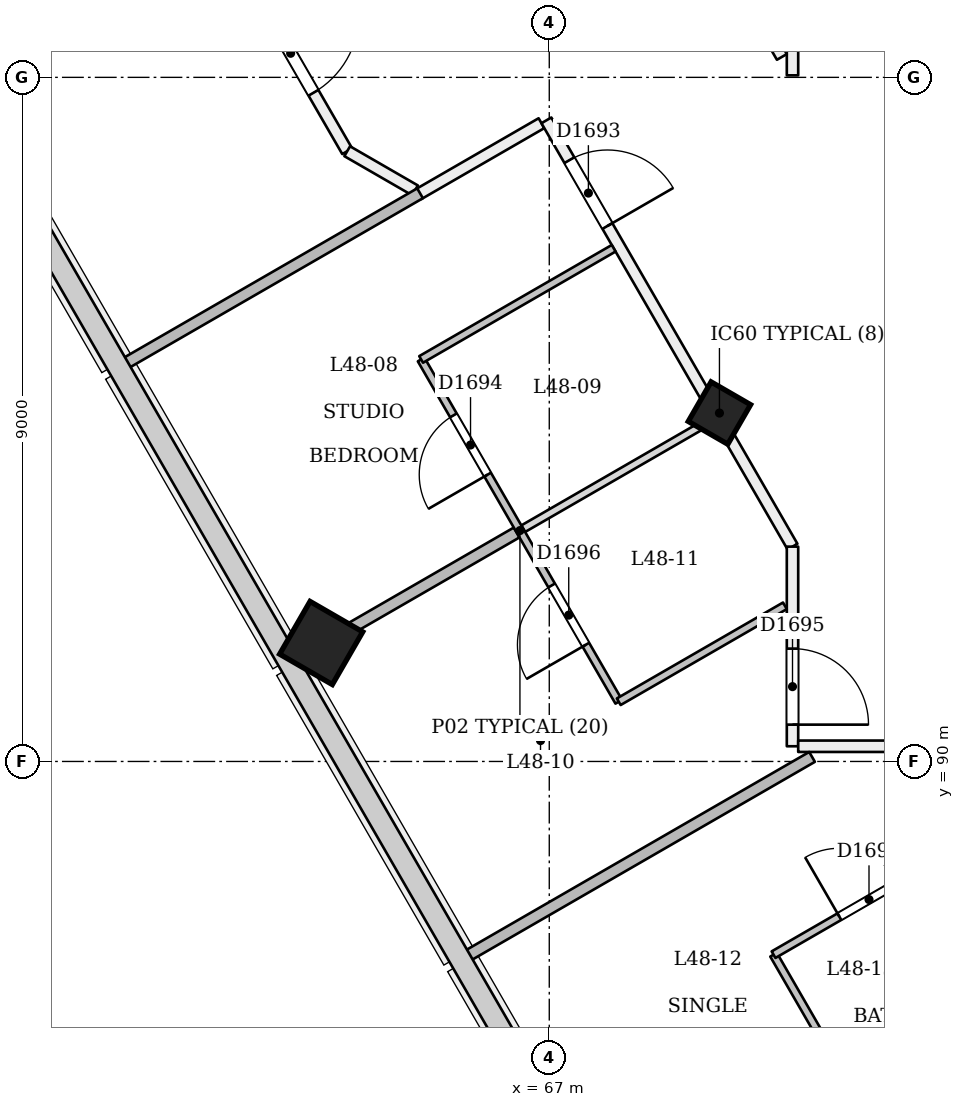
"""IFC4 building model, lengths in metres.
Left out: names, types, materials, properties, quantities, classifications, styles, units other than length and angle.
Written with IfcOpenShell. Run it as: python <this file> out.ifc"""

import sys

from ifc_helpers import new_model, si_unit, direction, frame, frame_2d, origin, origin_2d, place, context, subcontext, project, spatial, rectangle, extrude, element, fill, save


model = new_model("IFC4")
c1 = context("Model", 3, precision=1e-05, world=origin(), true_north=direction((0.0, 1.0)))
c2 = subcontext(c1, "Body", "Model", "MODEL_VIEW")
j1 = project(units=[si_unit("LENGTHUNIT", "METRE"), si_unit("PLANEANGLEUNIT", "RADIAN")], contexts=[c1])
p1 = place(None, origin())
s1 = spatial("IfcSite", under=j1, at=p1, CompositionType="ELEMENT")
p2 = place(p1, origin())
s2 = spatial("IfcBuilding", under=s1, at=p2, CompositionType="ELEMENT")
p3 = place(p2, frame((0.0, 0.0, 185.4)))
s3 = spatial("IfcBuildingStorey", under=s2, at=p3, CompositionType="ELEMENT", Elevation=185.4)
p4 = place(p3, frame((69.212, 94.537, -0.018), z_axis=(0.022222852987, 0.038483477124, 0.999012095419), x_axis=(-0.86564203211, -0.499182083575, 0.038485317735)))
e1 = element("IfcColumn", 1, at=p4, inside=s3, PredefinedType="COLUMN", context=c2, shape_type="SweptSolid", body=[
    extrude(rectangle(XDim=0.6, YDim=0.6, at=origin_2d()), origin(), (0.0, 0.0, 1.0), 3.604),
])
p5 = place(p3, frame((63.972, 91.511, -0.024), z_axis=(0.02220780257, 0.038426228083, 0.999014633777), x_axis=(-0.865818494865, -0.498879763134, 0.038435867164)))
e2 = element("IfcColumn", 2, at=p5, inside=s3, PredefinedType="COLUMN", context=c2, shape_type="SweptSolid", body=[
    extrude(rectangle(XDim=0.8, YDim=0.8, at=origin_2d()), origin(), (0.0, 0.0, 1.0), 3.628),
])
p6 = place(p3, frame((65.28, 97.463, 0.0), z_axis=(0.0, 0.0, 1.0), x_axis=(0.866046247233, 0.49996389635, 0.0)))
e3 = element("IfcWall", 3, at=p6, inside=s3, PredefinedType="PARTITIONING", context=c2, shape_type="SweptSolid", body=[
    extrude(rectangle(XDim=1.867, YDim=0.15, at=frame_2d((0.934, 0.0))), origin(), (0.0, 0.0, 1.0), 3.3),
])
p7 = place(p3, frame((66.962, 98.435, 0.0), z_axis=(0.0, 0.0, 1.0), x_axis=(0.499991148707, -0.866030514021, 0.0)))
e4 = element("IfcWall", 4, at=p7, inside=s3, PredefinedType="PARTITIONING", context=c2, shape_type="SweptSolid", body=[
    extrude(rectangle(XDim=6.476, YDim=0.15, at=frame_2d((3.238, 0.0))), origin(), (0.0, 0.0, 1.0), 2.9),
])
p8 = place(p7, frame((0.605, 0.0, 0.0)))
e5 = element("IfcOpeningElement", 5, at=p8, cuts=e4, PredefinedType="OPENING", context=c2, shape_type="SweptSolid", body=[
    extrude(rectangle(XDim=1.0, YDim=2.1, at=frame_2d((0.5, 1.05))), frame((0.0, 0.085, 0.0), z_axis=(0.0, -1.0, 0.0), x_axis=(1.0, 0.0, 0.0)), (0.0, 0.0, 1.0), 0.171),
])
p9 = place(p3, frame((70.2, 92.826, 0.0), z_axis=(0.0, 0.0, 1.0), x_axis=(0.0, -1.0, 0.0)))
e6 = element("IfcWall", 6, at=p9, inside=s3, PredefinedType="PARTITIONING", context=c2, shape_type="SweptSolid", body=[
    extrude(rectangle(XDim=2.626, YDim=0.15, at=frame_2d((1.313, 0.0))), origin(), (0.0, 0.0, 1.0), 3.3),
])
p10 = place(p9, frame((1.342, 0.0, 0.0)))
e7 = element("IfcOpeningElement", 7, at=p10, cuts=e6, PredefinedType="OPENING", context=c2, shape_type="SweptSolid", body=[
    extrude(rectangle(XDim=1.0, YDim=2.1, at=frame_2d((0.5, 1.05))), frame((0.0, 0.085, 0.0), z_axis=(0.0, -1.0, 0.0), x_axis=(1.0, 0.0, 0.0)), (0.0, 0.0, 1.0), 0.171),
])
p11 = place(p3, frame((70.275, 90.2, 0.0), z_axis=(0.0, 0.0, 1.0), x_axis=(1.0, 0.0, 0.0)))
e8 = element("IfcWall", 8, at=p11, inside=s3, PredefinedType="PARTITIONING", context=c2, shape_type="SweptSolid", body=[
    extrude(rectangle(XDim=1.441, YDim=0.15, at=frame_2d((0.721, 0.0))), origin(), (0.0, 0.0, 1.0), 3.3),
])
p12 = place(p3, frame((70.2, 101.4, 0.0), z_axis=(0.0, 0.0, 1.0), x_axis=(0.0, -1.0, 0.0)))
e9 = element("IfcWall", 9, at=p12, inside=s3, PredefinedType="PARTITIONING", context=c2, shape_type="SweptSolid", body=[
    extrude(rectangle(XDim=2.374, YDim=0.15, at=frame_2d((1.187, 0.0))), origin(), (0.0, 0.0, 1.0), 3.3),
])
p13 = place(p3, frame((70.06, 99.269, 0.0), z_axis=(0.0, 0.0, 1.0), x_axis=(-0.500063959222, 0.865988473761, 0.0)))
e10 = element("IfcWall", 10, at=p13, inside=s3, PredefinedType="PARTITIONING", context=c2, shape_type="SweptSolid", body=[
    extrude(rectangle(XDim=1.733, YDim=0.15, at=frame_2d((0.866, 0.0))), origin(), (0.0, 0.0, 1.0), 3.3),
])
p14 = place(p3, frame((63.133, 100.122, 0.0), z_axis=(0.0, 0.0, 1.0), x_axis=(0.500005054149, -0.86602248575, 0.0)))
e11 = element("IfcWall", 11, at=p14, inside=s3, PredefinedType="PARTITIONING", context=c2, shape_type="SweptSolid", body=[
    extrude(rectangle(XDim=2.418, YDim=0.15, at=frame_2d((1.209, 0.0))), origin(), (0.0, 0.0, 1.0), 3.3),
])
p15 = place(p14, frame((0.33, 0.0, 0.0)))
e12 = element("IfcOpeningElement", 12, at=p15, cuts=e11, PredefinedType="OPENING", context=c2, shape_type="SweptSolid", body=[
    extrude(rectangle(XDim=1.2, YDim=2.1, at=frame_2d((0.6, 1.05))), frame((0.0, 0.085, 0.0), z_axis=(0.0, -1.0, 0.0), x_axis=(1.0, 0.0, 0.0)), (0.0, 0.0, 1.0), 0.171),
])
p16 = place(p3, frame((64.342, 98.028, 0.0), z_axis=(0.0, 0.0, 1.0), x_axis=(0.865988239976, -0.50006436408, 0.0)))
e13 = element("IfcWall", 13, at=p16, inside=s3, PredefinedType="PARTITIONING", context=c2, shape_type="SweptSolid", body=[
    extrude(rectangle(XDim=1.03, YDim=0.15, at=frame_2d((0.515, 0.0))), origin(), (0.0, 0.0, 1.0), 3.3),
])
p17 = place(p3, frame((67.914, 90.786, 0.0), z_axis=(0.0, 0.0, 1.0), x_axis=(-0.499971721724, 0.866041729639, 0.0)))
e14 = element("IfcWall", 14, at=p17, inside=s3, PredefinedType="PARTITIONING", context=c2, shape_type="SweptSolid", body=[
    extrude(rectangle(XDim=5.2, YDim=0.1, at=frame_2d((2.6, 0.0))), origin(), (0.0, 0.0, 1.0), 2.9),
])
p18 = place(p17, frame((3.45, 0.0, 0.0)))
e15 = element("IfcOpeningElement", 15, at=p18, cuts=e14, PredefinedType="OPENING", context=c2, shape_type="SweptSolid", body=[
    extrude(rectangle(XDim=0.9, YDim=2.1, at=frame_2d((0.45, 1.05))), frame((0.0, 0.061, 0.0), z_axis=(0.0, -1.0, 0.0), x_axis=(1.0, 0.0, 0.0)), (0.0, 0.0, 1.0), 0.121),
])
p19 = place(p17, frame((0.866, 0.0, 0.0)))
e16 = element("IfcOpeningElement", 16, at=p19, cuts=e14, PredefinedType="OPENING", context=c2, shape_type="SweptSolid", body=[
    extrude(rectangle(XDim=0.9, YDim=2.1, at=frame_2d((0.45, 1.05))), frame((0.0, 0.061, 0.0), z_axis=(0.0, -1.0, 0.0), x_axis=(1.0, 0.0, 0.0)), (0.0, 0.0, 1.0), 0.121),
])
p20 = place(p3, frame((65.314, 95.289, 0.0), z_axis=(0.0, 0.0, 1.0), x_axis=(0.866025730634, 0.499999433879, 0.0)))
e17 = element("IfcWall", 17, at=p20, inside=s3, PredefinedType="PARTITIONING", context=c2, shape_type="SweptSolid", body=[
    extrude(rectangle(XDim=2.925, YDim=0.1, at=frame_2d((1.462, 0.0))), origin(), (0.0, 0.0, 1.0), 3.3),
])
p21 = place(p3, frame((63.67, 91.337, 0.0), z_axis=(0.0, 0.0, 1.0), x_axis=(0.866014461049, 0.500018952895, 0.0)))
e18 = element("IfcWall", 18, at=p21, inside=s3, PredefinedType="PARTITIONING", context=c2, shape_type="SweptSolid", body=[
    extrude(rectangle(XDim=3.35, YDim=0.15, at=frame_2d((1.675, 0.0))), origin(), (0.0, 0.0, 1.0), 2.9),
])
p22 = place(p3, frame((65.3, 97.475, 0.0), z_axis=(0.0, 0.0, 1.0), x_axis=(-0.866024802457, -0.500001041529, 0.0)))
e19 = element("IfcWall", 19, at=p22, inside=s3, PredefinedType="PARTITIONING", context=c2, shape_type="SweptSolid", body=[
    extrude(rectangle(XDim=4.501, YDim=0.15, at=frame_2d((2.25, 0.0))), origin(), (0.0, 0.0, 1.0), 3.3),
])
p23 = place(p3, frame((66.657, 93.062, 0.0), z_axis=(0.0, 0.0, 1.0), x_axis=(0.866018712932, 0.500011588718, 0.0)))
e20 = element("IfcWall", 20, at=p23, inside=s3, PredefinedType="PARTITIONING", context=c2, shape_type="SweptSolid", body=[
    extrude(rectangle(XDim=2.875, YDim=0.1, at=frame_2d((1.438, 0.0))), origin(), (0.0, 0.0, 1.0), 2.9),
])
p24 = place(p3, frame((70.1, 92.048, 0.0), z_axis=(0.0, 0.0, 1.0), x_axis=(-0.866008413041, -0.500029427677, 0.0)))
e21 = element("IfcWall", 21, at=p24, inside=s3, PredefinedType="PARTITIONING", context=c2, shape_type="SweptSolid", body=[
    extrude(rectangle(XDim=2.524, YDim=0.1, at=frame_2d((1.262, 0.0))), origin(), (0.0, 0.0, 1.0), 3.3),
])
p25 = place(p3, frame((65.902, 87.43, 0.0), z_axis=(0.0, 0.0, 1.0), x_axis=(0.86602945008, 0.499992991546, 0.0)))
e22 = element("IfcWall", 22, at=p25, inside=s3, PredefinedType="PARTITIONING", context=c2, shape_type="SweptSolid", body=[
    extrude(rectangle(XDim=5.26, YDim=0.15, at=frame_2d((2.63, 0.0))), origin(), (0.0, 0.0, 1.0), 3.3),
])
p26 = place(p3, frame((71.051, 85.553, 0.0), z_axis=(0.0, 0.0, 1.0), x_axis=(-0.50002983664, 0.866008176907, 0.0)))
e23 = element("IfcWall", 23, at=p26, inside=s3, PredefinedType="PARTITIONING", context=c2, shape_type="SweptSolid", body=[
    extrude(rectangle(XDim=2.2, YDim=0.1, at=frame_2d((1.1, 0.0))), origin(), (0.0, 0.0, 1.0), 3.3),
])
p27 = place(p3, frame((69.951, 87.458, 0.0), z_axis=(0.0, 0.0, 1.0), x_axis=(0.866048868473, 0.499959355765, 0.0)))
e24 = element("IfcWall", 24, at=p27, inside=s3, PredefinedType="PARTITIONING", context=c2, shape_type="SweptSolid", body=[
    extrude(rectangle(XDim=2.825, YDim=0.1, at=frame_2d((1.413, 0.0))), origin(), (0.0, 0.0, 1.0), 3.3),
])
p28 = place(p27, frame((1.0, 0.0, 0.0)))
e25 = element("IfcOpeningElement", 25, at=p28, cuts=e24, PredefinedType="OPENING", context=c2, shape_type="SweptSolid", body=[
    extrude(rectangle(XDim=0.9, YDim=2.1, at=frame_2d((0.45, 1.05))), frame((0.0, 0.061, 0.0), z_axis=(0.0, -1.0, 0.0), x_axis=(1.0, 0.0, 0.0)), (0.0, 0.0, 1.0), 0.121),
])
p29 = place(p3, frame((71.183, 85.283, 0.0), z_axis=(0.0, 0.0, 1.0), x_axis=(0.866048401274, 0.499960165064, 0.0)))
e26 = element("IfcWall", 26, at=p29, inside=s3, PredefinedType="PARTITIONING", context=c2, shape_type="SweptSolid", body=[
    extrude(rectangle(XDim=2.845, YDim=0.1, at=frame_2d((1.422, 0.0))), origin(), (0.0, 0.0, 1.0), 2.9),
])
p30 = place(p8, origin())
e27 = element("IfcDoor", 27, at=p30, inside=s3, OperationType="SINGLE_SWING_RIGHT", PredefinedType="NOTDEFINED", context=c2, shape_type="SweptSolid", body=[
    extrude(rectangle(XDim=1.0, YDim=2.1, at=frame_2d((0.5, 1.05))), frame((0.0, 0.025, 0.0), z_axis=(0.0, -1.0, 0.0), x_axis=(1.0, 0.0, 0.0)), (0.0, 0.0, 1.0), 0.05),
])
fill(e5, e27)
p31 = place(p18, origin())
e28 = element("IfcDoor", 28, at=p31, inside=s3, OperationType="SINGLE_SWING_LEFT", PredefinedType="NOTDEFINED", context=c2, shape_type="SweptSolid", body=[
    extrude(rectangle(XDim=0.9, YDim=2.1, at=frame_2d((0.45, 1.05))), frame((0.0, 0.025, 0.0), z_axis=(0.0, -1.0, 0.0), x_axis=(1.0, 0.0, 0.0)), (0.0, 0.0, 1.0), 0.05),
])
fill(e15, e28)
p32 = place(p10, origin())
e29 = element("IfcDoor", 29, at=p32, inside=s3, OperationType="SINGLE_SWING_RIGHT", PredefinedType="NOTDEFINED", context=c2, shape_type="SweptSolid", body=[
    extrude(rectangle(XDim=1.0, YDim=2.1, at=frame_2d((0.5, 1.05))), frame((0.0, 0.025, 0.0), z_axis=(0.0, -1.0, 0.0), x_axis=(1.0, 0.0, 0.0)), (0.0, 0.0, 1.0), 0.05),
])
fill(e7, e29)
p33 = place(p19, origin())
e30 = element("IfcDoor", 30, at=p33, inside=s3, OperationType="SINGLE_SWING_LEFT", PredefinedType="NOTDEFINED", context=c2, shape_type="SweptSolid", body=[
    extrude(rectangle(XDim=0.9, YDim=2.1, at=frame_2d((0.45, 1.05))), frame((0.0, 0.025, 0.0), z_axis=(0.0, -1.0, 0.0), x_axis=(1.0, 0.0, 0.0)), (0.0, 0.0, 1.0), 0.05),
])
fill(e16, e30)
p34 = place(p28, origin())
e31 = element("IfcDoor", 31, at=p34, inside=s3, OperationType="SINGLE_SWING_LEFT", PredefinedType="NOTDEFINED", context=c2, shape_type="SweptSolid", body=[
    extrude(rectangle(XDim=0.9, YDim=2.1, at=frame_2d((0.45, 1.05))), frame((0.0, 0.025, 0.0), z_axis=(0.0, -1.0, 0.0), x_axis=(1.0, 0.0, 0.0)), (0.0, 0.0, 1.0), 0.05),
])
fill(e25, e31)
p35 = place(p15, origin())
e32 = element("IfcDoor", 32, at=p35, inside=s3, OperationType="SINGLE_SWING_LEFT", PredefinedType="NOTDEFINED", context=c2, shape_type="SweptSolid", body=[
    extrude(rectangle(XDim=1.2, YDim=2.1, at=frame_2d((0.6, 1.05))), frame((0.0, 0.025, 0.0), z_axis=(0.0, -1.0, 0.0), x_axis=(1.0, 0.0, 0.0)), (0.0, 0.0, 1.0), 0.05),
])
fill(e12, e32)
save(model, sys.argv[1])
